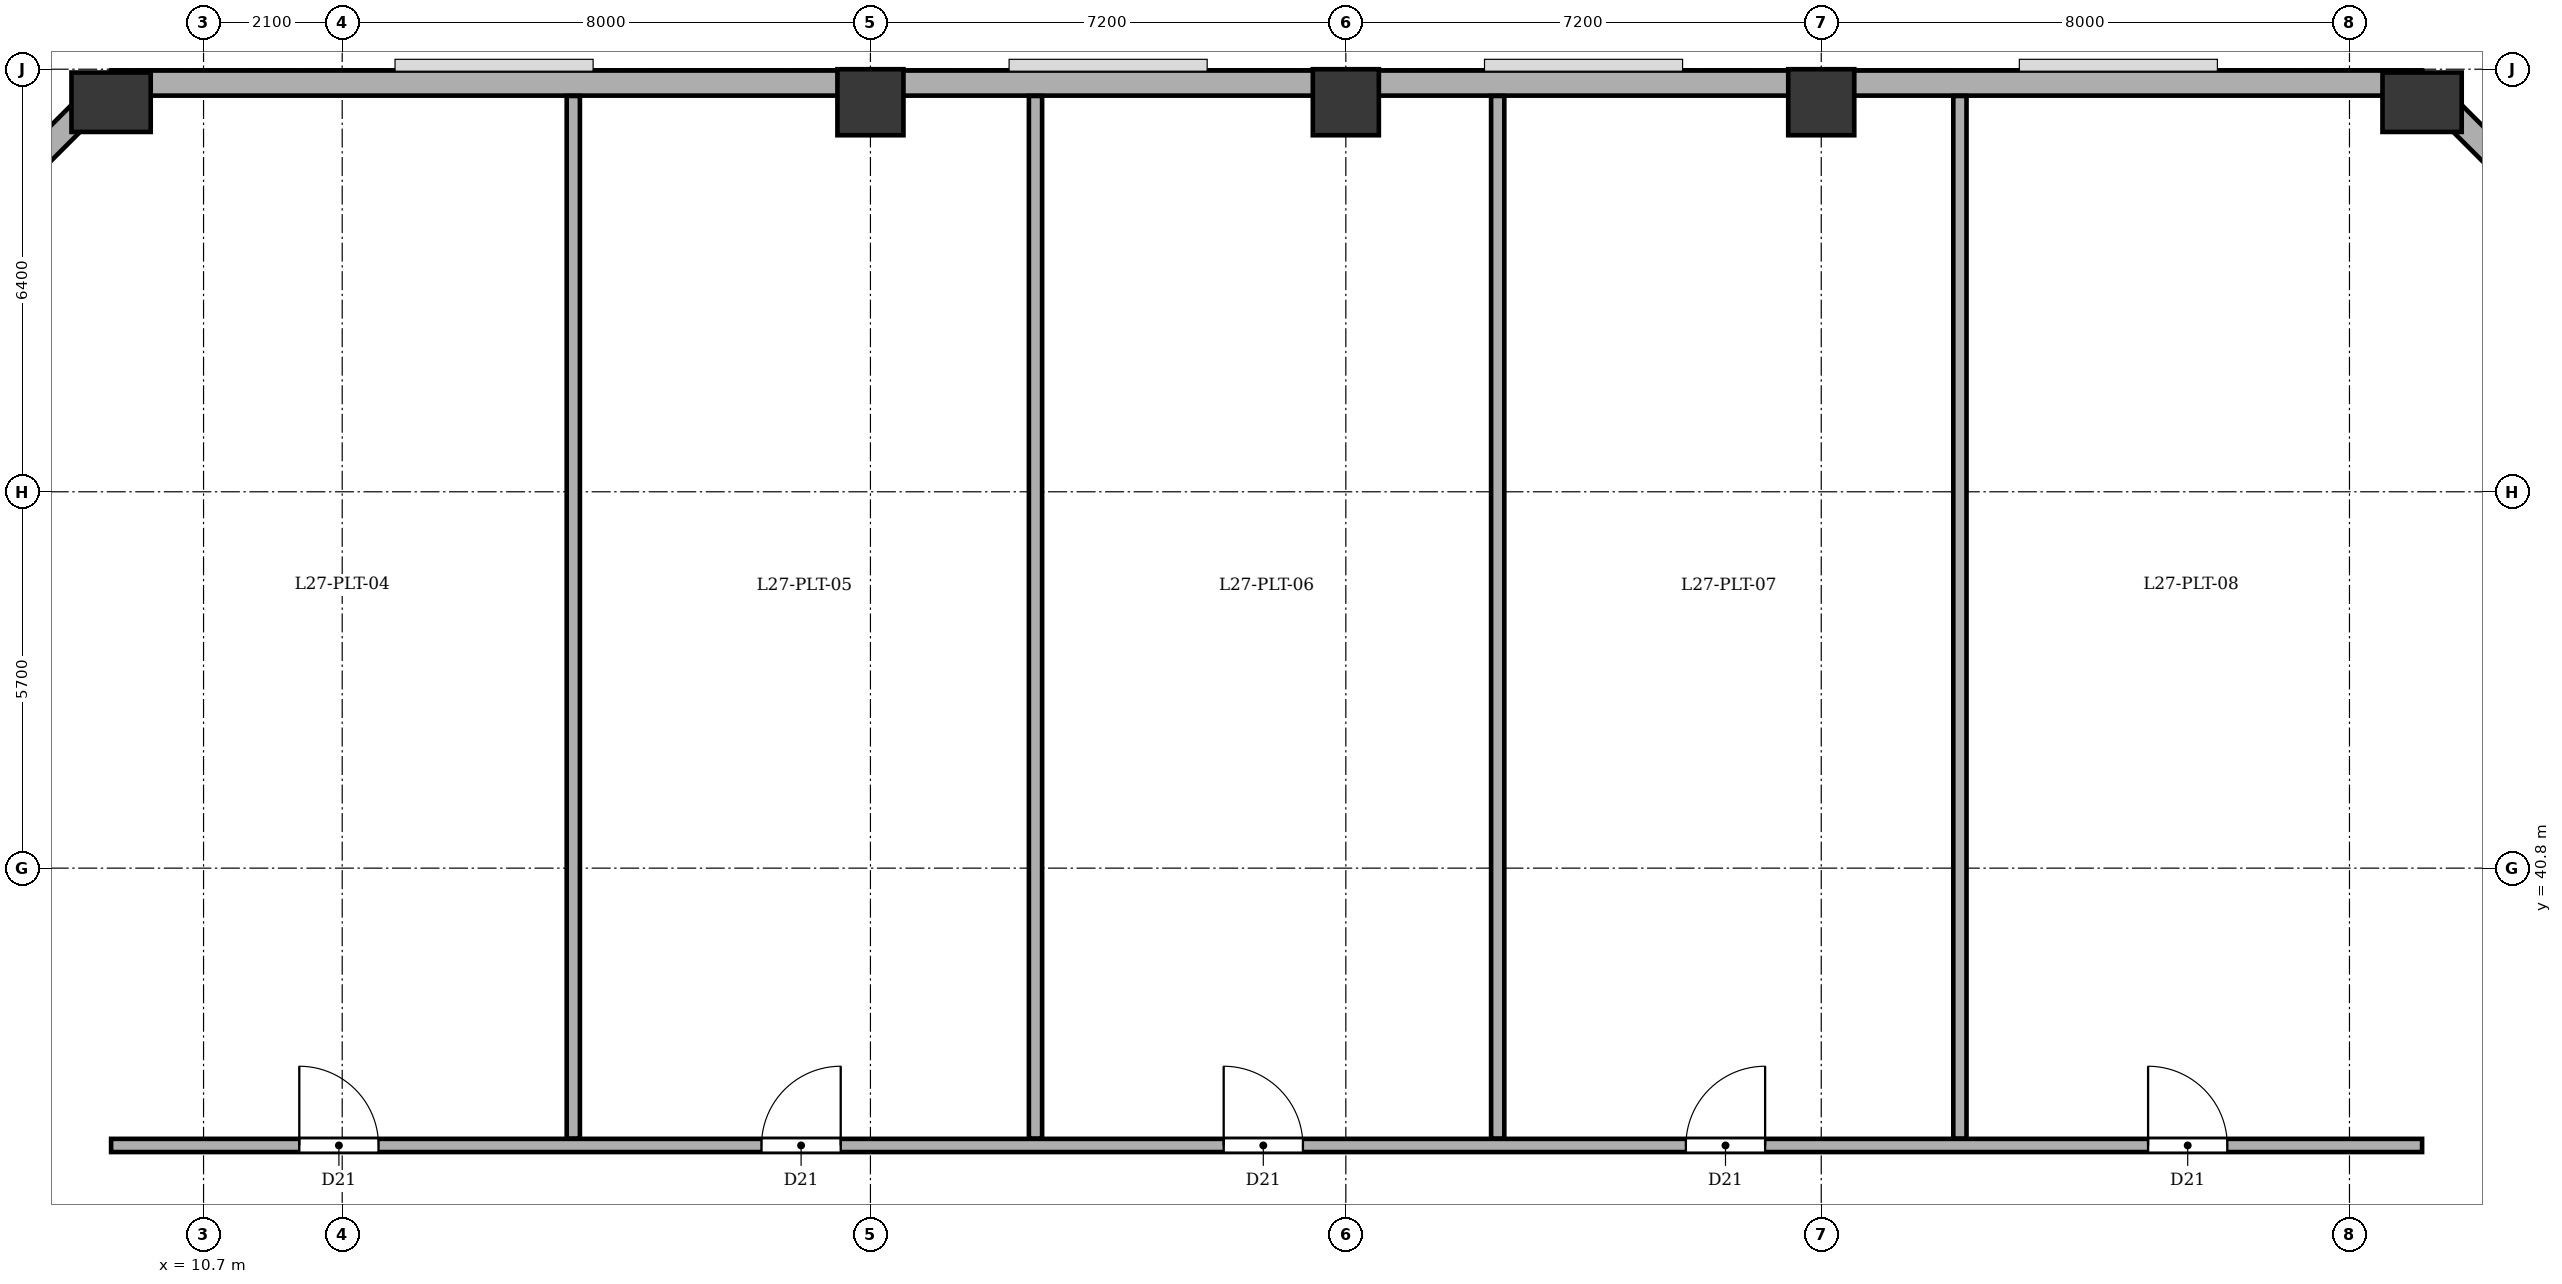
"""IFC4 building model, lengths in metres.
Left out: names, types, materials, properties, quantities, classifications, styles, units other than length and angle.
Written with IfcOpenShell. Run it as: python <this file> out.ifc"""

import sys

from ifc_helpers import new_model, si_unit, direction, frame, frame_2d, origin, origin_2d, place, context, subcontext, project, spatial, rectangle, extrude, element, fill, save


model = new_model("IFC4")
c1 = context("Model", 3, precision=1e-05, world=origin(), true_north=direction((0.0, 1.0)))
c2 = subcontext(c1, "Body", "Model", "MODEL_VIEW")
j1 = project(units=[si_unit("LENGTHUNIT", "METRE"), si_unit("PLANEANGLEUNIT", "RADIAN")], contexts=[c1])
p1 = place(None, origin())
s1 = spatial("IfcSite", under=j1, at=p1, CompositionType="ELEMENT")
p2 = place(p1, origin())
s2 = spatial("IfcBuilding", under=s1, at=p2, CompositionType="ELEMENT")
p3 = place(p2, frame((0.0, 0.0, 110.1)))
s3 = spatial("IfcBuildingStorey", under=s2, at=p3, CompositionType="ELEMENT", Elevation=110.1)
p4 = place(p3, frame((9.3, 52.4, 0.0), z_axis=(0.0, 0.0, 1.0), x_axis=(1.0, 0.0, 0.0)))
e1 = element("IfcColumn", 1, at=p4, inside=s3, PredefinedType="COLUMN", context=c2, shape_type="SweptSolid", body=[
    extrude(rectangle(XDim=0.9, YDim=1.2, at=origin_2d()), origin(), (0.0, 0.0, 1.0), 5.4),
])
for number, where, z_axis, x_axis in (
    (2, (20.8, 52.4, 0.0), (0.0, 0.0, 1.0), (1.0, 0.0, 0.0)),
    (3, (28.0, 52.4, 0.0), (0.0, 0.0, 1.0), (1.0, 0.0, 0.0)),
    (4, (35.2, 52.4, 0.0), (0.0, 0.0, 1.0), (1.0, 0.0, 0.0)),
):
    element("IfcColumn", number, at=place(p3, frame(where, z_axis=z_axis, x_axis=x_axis)), inside=s3, PredefinedType="COLUMN", context=c2, shape_type="SweptSolid", body=[
        extrude(rectangle(XDim=1.0, YDim=1.0, at=origin_2d()), origin(), (0.0, 0.0, 1.0), 5.4),
    ])
p5 = place(p3, frame((44.3, 52.4, 0.0), z_axis=(0.0, 0.0, 1.0), x_axis=(1.0, 0.0, 0.0)))
e5 = element("IfcColumn", 5, at=p5, inside=s3, PredefinedType="COLUMN", context=c2, shape_type="SweptSolid", body=[
    extrude(rectangle(XDim=0.9, YDim=1.2, at=origin_2d()), origin(), (0.0, 0.0, 1.0), 5.4),
])
p6 = place(p3, frame((4.51, 47.9, 0.0), z_axis=(0.0, 0.0, 1.0), x_axis=(0.707106781187, 0.707106781187, 0.0)))
e6 = element("IfcWall", 6, at=p6, inside=s3, PredefinedType="STANDARD", context=c2, shape_type="SweptSolid", body=[
    extrude(rectangle(XDim=6.774, YDim=0.38, at=frame_2d((3.387, 0.0))), origin(), (0.0, 0.0, 1.0), 4.575),
])
p7 = place(p3, frame((9.3, 52.69, 0.0), z_axis=(0.0, 0.0, 1.0), x_axis=(1.0, 0.0, 0.0)))
e7 = element("IfcWall", 7, at=p7, inside=s3, PredefinedType="STANDARD", context=c2, shape_type="SweptSolid", body=[
    extrude(rectangle(XDim=35.0, YDim=0.38, at=frame_2d((17.5, 0.0))), origin(), (0.0, 0.0, 1.0), 4.575),
])
p8 = place(p3, frame((44.3, 52.69, 0.0), z_axis=(0.0, 0.0, 1.0), x_axis=(0.707106781187, -0.707106781187, 0.0)))
e8 = element("IfcWall", 8, at=p8, inside=s3, PredefinedType="STANDARD", context=c2, shape_type="SweptSolid", body=[
    extrude(rectangle(XDim=6.774, YDim=0.38, at=frame_2d((3.387, 0.0))), origin(), (0.0, 0.0, 1.0), 4.575),
])
p9 = place(p3, frame((9.3, 36.6, 0.0), z_axis=(0.0, 0.0, 1.0), x_axis=(1.0, 0.0, 0.0)))
e9 = element("IfcWall", 9, at=p9, inside=s3, PredefinedType="SOLIDWALL", context=c2, shape_type="SweptSolid", body=[
    extrude(rectangle(XDim=35.0, YDim=0.2, at=frame_2d((17.5, 0.0))), origin(), (0.0, 0.0, 1.0), 5.04),
])
p10 = place(p9, frame((2.85, 0.0, 0.0)))
e10 = element("IfcOpeningElement", 10, at=p10, cuts=e9, PredefinedType="OPENING", context=c2, shape_type="SweptSolid", body=[
    extrude(rectangle(XDim=1.2, YDim=2.15, at=frame_2d((0.6, 1.075))), frame((0.0, 0.11, 0.0), z_axis=(0.0, -1.0, 0.0), x_axis=(1.0, 0.0, 0.0)), (0.0, 0.0, 1.0), 0.22),
])
p11 = place(p9, frame((9.85, 0.0, 0.0)))
e11 = element("IfcOpeningElement", 11, at=p11, cuts=e9, PredefinedType="OPENING", context=c2, shape_type="SweptSolid", body=[
    extrude(rectangle(XDim=1.2, YDim=2.15, at=frame_2d((0.6, 1.075))), frame((0.0, 0.11, 0.0), z_axis=(0.0, -1.0, 0.0), x_axis=(1.0, 0.0, 0.0)), (0.0, 0.0, 1.0), 0.22),
])
p12 = place(p9, frame((16.85, 0.0, 0.0)))
e12 = element("IfcOpeningElement", 12, at=p12, cuts=e9, PredefinedType="OPENING", context=c2, shape_type="SweptSolid", body=[
    extrude(rectangle(XDim=1.2, YDim=2.15, at=frame_2d((0.6, 1.075))), frame((0.0, 0.11, 0.0), z_axis=(0.0, -1.0, 0.0), x_axis=(1.0, 0.0, 0.0)), (0.0, 0.0, 1.0), 0.22),
])
p13 = place(p9, frame((23.85, 0.0, 0.0)))
e13 = element("IfcOpeningElement", 13, at=p13, cuts=e9, PredefinedType="OPENING", context=c2, shape_type="SweptSolid", body=[
    extrude(rectangle(XDim=1.2, YDim=2.15, at=frame_2d((0.6, 1.075))), frame((0.0, 0.11, 0.0), z_axis=(0.0, -1.0, 0.0), x_axis=(1.0, 0.0, 0.0)), (0.0, 0.0, 1.0), 0.22),
])
p14 = place(p9, frame((30.85, 0.0, 0.0)))
e14 = element("IfcOpeningElement", 14, at=p14, cuts=e9, PredefinedType="OPENING", context=c2, shape_type="SweptSolid", body=[
    extrude(rectangle(XDim=1.2, YDim=2.15, at=frame_2d((0.6, 1.075))), frame((0.0, 0.11, 0.0), z_axis=(0.0, -1.0, 0.0), x_axis=(1.0, 0.0, 0.0)), (0.0, 0.0, 1.0), 0.22),
])
for number, where, z_axis, x_axis in (
    (15, (16.3, 36.705, 0.0), (0.0, 0.0, 1.0), (0.0, 1.0, 0.0)),
    (16, (23.3, 36.705, 0.0), (0.0, 0.0, 1.0), (0.0, 1.0, 0.0)),
    (17, (30.3, 36.705, 0.0), (0.0, 0.0, 1.0), (0.0, 1.0, 0.0)),
    (18, (37.3, 36.705, 0.0), (0.0, 0.0, 1.0), (0.0, 1.0, 0.0)),
):
    element("IfcWall", number, at=place(p3, frame(where, z_axis=z_axis, x_axis=x_axis)), inside=s3, PredefinedType="SOLIDWALL", context=c2, shape_type="SweptSolid", body=[
        extrude(rectangle(XDim=15.79, YDim=0.2, at=frame_2d((7.895, 0.0))), origin(), (0.0, 0.0, 1.0), 5.04),
    ])
p15 = place(p10, origin())
e19 = element("IfcDoor", 19, at=p15, inside=s3, OperationType="SINGLE_SWING_LEFT", PredefinedType="DOOR", context=c2, shape_type="SweptSolid", body=[
    extrude(rectangle(XDim=1.2, YDim=2.15, at=frame_2d((0.6, 1.075))), frame((0.0, 0.025, 0.0), z_axis=(0.0, -1.0, 0.0), x_axis=(1.0, 0.0, 0.0)), (0.0, 0.0, 1.0), 0.05),
])
fill(e10, e19)
p16 = place(p11, origin())
e20 = element("IfcDoor", 20, at=p16, inside=s3, OperationType="SINGLE_SWING_RIGHT", PredefinedType="DOOR", context=c2, shape_type="SweptSolid", body=[
    extrude(rectangle(XDim=1.2, YDim=2.15, at=frame_2d((0.6, 1.075))), frame((0.0, 0.025, 0.0), z_axis=(0.0, -1.0, 0.0), x_axis=(1.0, 0.0, 0.0)), (0.0, 0.0, 1.0), 0.05),
])
fill(e11, e20)
p17 = place(p12, origin())
e21 = element("IfcDoor", 21, at=p17, inside=s3, OperationType="SINGLE_SWING_LEFT", PredefinedType="DOOR", context=c2, shape_type="SweptSolid", body=[
    extrude(rectangle(XDim=1.2, YDim=2.15, at=frame_2d((0.6, 1.075))), frame((0.0, 0.025, 0.0), z_axis=(0.0, -1.0, 0.0), x_axis=(1.0, 0.0, 0.0)), (0.0, 0.0, 1.0), 0.05),
])
fill(e12, e21)
p18 = place(p13, origin())
e22 = element("IfcDoor", 22, at=p18, inside=s3, OperationType="SINGLE_SWING_RIGHT", PredefinedType="DOOR", context=c2, shape_type="SweptSolid", body=[
    extrude(rectangle(XDim=1.2, YDim=2.15, at=frame_2d((0.6, 1.075))), frame((0.0, 0.025, 0.0), z_axis=(0.0, -1.0, 0.0), x_axis=(1.0, 0.0, 0.0)), (0.0, 0.0, 1.0), 0.05),
])
fill(e13, e22)
p19 = place(p14, origin())
e23 = element("IfcDoor", 23, at=p19, inside=s3, OperationType="SINGLE_SWING_LEFT", PredefinedType="DOOR", context=c2, shape_type="SweptSolid", body=[
    extrude(rectangle(XDim=1.2, YDim=2.15, at=frame_2d((0.6, 1.075))), frame((0.0, 0.025, 0.0), z_axis=(0.0, -1.0, 0.0), x_axis=(1.0, 0.0, 0.0)), (0.0, 0.0, 1.0), 0.05),
])
fill(e14, e23)
save(model, sys.argv[1])
